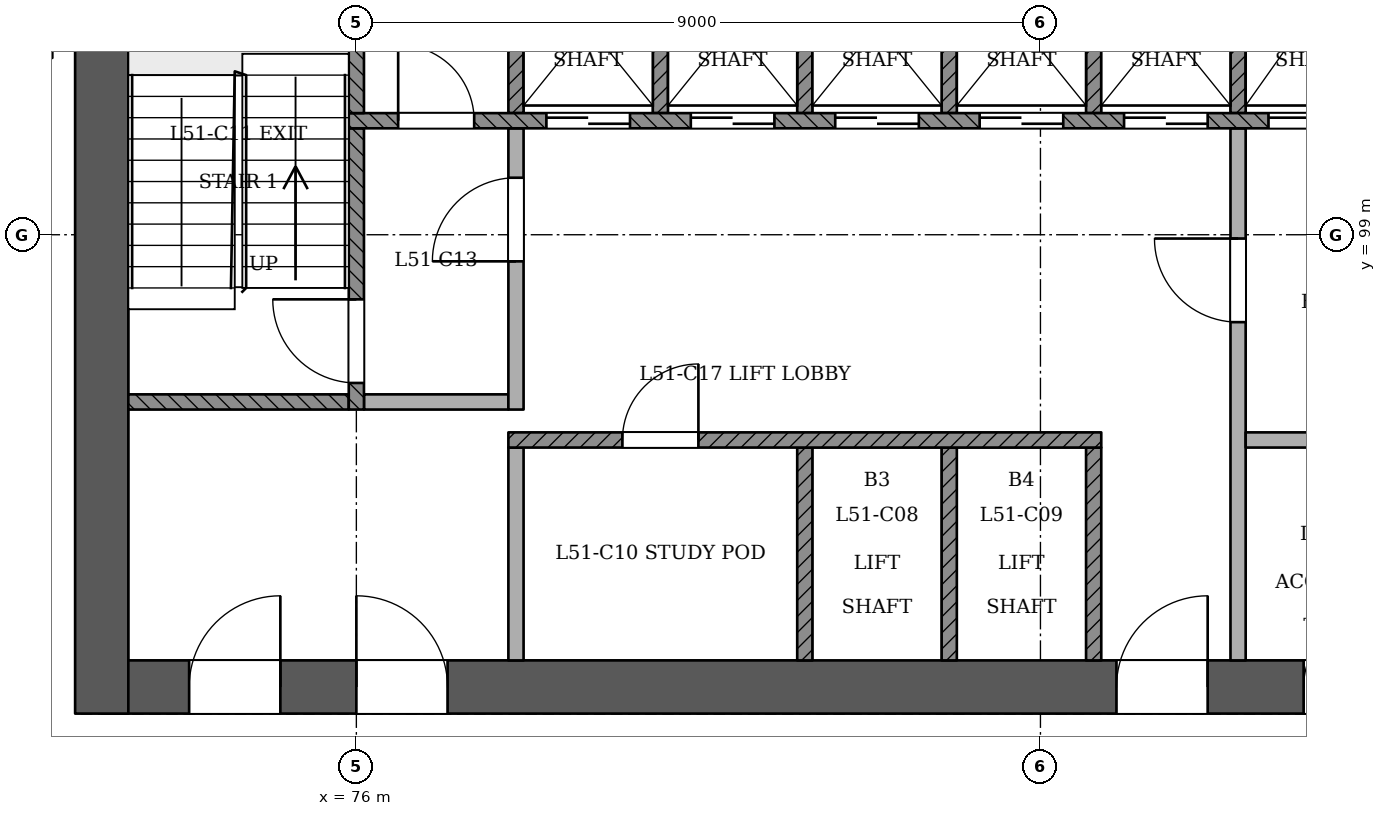
"""IFC4 building model, lengths in metres.
Left out: names, types, materials, properties, quantities, classifications, styles, units other than length and angle.
Written with IfcOpenShell. Run it as: python <this file> out.ifc"""

import sys

from ifc_helpers import new_model, si_unit, direction, frame, frame_2d, origin, place, context, subcontext, project, spatial, rectangle, extrude, element, fill, save


model = new_model("IFC4")
c1 = context("Model", 3, precision=1e-05, world=origin(), true_north=direction((0.0, 1.0)))
c2 = subcontext(c1, "Body", "Model", "MODEL_VIEW")
j1 = project(units=[si_unit("LENGTHUNIT", "METRE"), si_unit("PLANEANGLEUNIT", "RADIAN")], contexts=[c1])
p1 = place(None, origin())
s1 = spatial("IfcSite", under=j1, at=p1, CompositionType="ELEMENT")
p2 = place(p1, origin())
s2 = spatial("IfcBuilding", under=s1, at=p2, CompositionType="ELEMENT")
p3 = place(p2, frame((0.0, 0.0, 198.0)))
s3 = spatial("IfcBuildingStorey", under=s2, at=p3, CompositionType="ELEMENT", Elevation=198.0)
p4 = place(p3, frame((72.65, 93.05, 0.0), z_axis=(0.0, 0.0, 1.0), x_axis=(1.0, 0.0, 0.0)))
e1 = element("IfcWall", 1, at=p4, inside=s3, PredefinedType="SHEAR", context=c2, shape_type="SweptSolid", body=[
    extrude(rectangle(XDim=25.05, YDim=0.7, at=frame_2d((12.525, 0.0))), origin(), (0.0, 0.0, 1.0), 3.6),
])
p5 = place(p4, frame((1.15, 0.0, 0.0)))
e2 = element("IfcOpeningElement", 2, at=p5, cuts=e1, PredefinedType="OPENING", context=c2, shape_type="SweptSolid", body=[
    extrude(rectangle(XDim=1.2, YDim=2.1, at=frame_2d((0.6, 1.05))), frame((0.0, 0.36, 0.0), z_axis=(0.0, -1.0, 0.0), x_axis=(1.0, 0.0, 0.0)), (0.0, 0.0, 1.0), 0.721),
])
p6 = place(p4, frame((3.35, 0.0, 0.0)))
e3 = element("IfcOpeningElement", 3, at=p6, cuts=e1, PredefinedType="OPENING", context=c2, shape_type="SweptSolid", body=[
    extrude(rectangle(XDim=1.2, YDim=2.1, at=frame_2d((0.6, 1.05))), frame((0.0, 0.36, 0.0), z_axis=(0.0, -1.0, 0.0), x_axis=(1.0, 0.0, 0.0)), (0.0, 0.0, 1.0), 0.721),
])
p7 = place(p4, frame((13.35, 0.0, 0.0)))
e4 = element("IfcOpeningElement", 4, at=p7, cuts=e1, PredefinedType="OPENING", context=c2, shape_type="SweptSolid", body=[
    extrude(rectangle(XDim=1.2, YDim=2.1, at=frame_2d((0.6, 1.05))), frame((0.0, 0.36, 0.0), z_axis=(0.0, -1.0, 0.0), x_axis=(1.0, 0.0, 0.0)), (0.0, 0.0, 1.0), 0.721),
])
p8 = place(p4, frame((15.812, 0.0, 0.0)))
e5 = element("IfcOpeningElement", 5, at=p8, cuts=e1, PredefinedType="OPENING", context=c2, shape_type="SweptSolid", body=[
    extrude(rectangle(XDim=1.0, YDim=2.1, at=frame_2d((0.5, 1.05))), frame((0.0, 0.36, 0.0), z_axis=(0.0, -1.0, 0.0), x_axis=(1.0, 0.0, 0.0)), (0.0, 0.0, 1.0), 0.721),
])
p9 = place(p4, frame((18.25, 0.0, 0.0)))
e6 = element("IfcOpeningElement", 6, at=p9, cuts=e1, PredefinedType="OPENING", context=c2, shape_type="SweptSolid", body=[
    extrude(rectangle(XDim=1.0, YDim=2.1, at=frame_2d((0.5, 1.05))), frame((0.0, 0.36, 0.0), z_axis=(0.0, -1.0, 0.0), x_axis=(1.0, 0.0, 0.0)), (0.0, 0.0, 1.0), 0.721),
])
p10 = place(p4, frame((20.6, 0.0, 0.0)))
e7 = element("IfcOpeningElement", 7, at=p10, cuts=e1, PredefinedType="OPENING", context=c2, shape_type="SweptSolid", body=[
    extrude(rectangle(XDim=1.0, YDim=2.1, at=frame_2d((0.5, 1.05))), frame((0.0, 0.36, 0.0), z_axis=(0.0, -1.0, 0.0), x_axis=(1.0, 0.0, 0.0)), (0.0, 0.0, 1.0), 0.721),
])
p11 = place(p4, frame((22.887, 0.0, 0.0)))
e8 = element("IfcOpeningElement", 8, at=p11, cuts=e1, PredefinedType="OPENING", context=c2, shape_type="SweptSolid", body=[
    extrude(rectangle(XDim=1.0, YDim=2.1, at=frame_2d((0.5, 1.05))), frame((0.0, 0.36, 0.0), z_axis=(0.0, -1.0, 0.0), x_axis=(1.0, 0.0, 0.0)), (0.0, 0.0, 1.0), 0.721),
])
p12 = place(p3, frame((72.65, 103.75, 0.0), z_axis=(0.0, 0.0, 1.0), x_axis=(0.0, -1.0, 0.0)))
e9 = element("IfcWall", 9, at=p12, inside=s3, PredefinedType="SHEAR", context=c2, shape_type="SweptSolid", body=[
    extrude(rectangle(XDim=11.05, YDim=0.7, at=frame_2d((5.525, 0.0))), origin(), (0.0, 0.0, 1.0), 3.6),
])
p13 = place(p3, frame((78.1, 93.4, 0.0), z_axis=(0.0, 0.0, 1.0), x_axis=(0.0, 1.0, 0.0)))
e10 = element("IfcWall", 10, at=p13, inside=s3, PredefinedType="PARTITIONING", context=c2, shape_type="SweptSolid", body=[
    extrude(rectangle(XDim=2.8, YDim=0.2, at=frame_2d((1.4, 0.0))), origin(), (0.0, 0.0, 1.0), 3.15),
])
for number, where, z_axis, x_axis in (
    (11, (81.9, 93.4, 0.0), (0.0, 0.0, 1.0), (0.0, 1.0, 0.0)),
    (12, (83.8, 93.4, 0.0), (0.0, 0.0, 1.0), (0.0, 1.0, 0.0)),
    (13, (85.7, 93.4, 0.0), (0.0, 0.0, 1.0), (0.0, 1.0, 0.0)),
):
    element("IfcWall", number, at=place(p3, frame(where, z_axis=z_axis, x_axis=x_axis)), inside=s3, PredefinedType="SOLIDWALL", context=c2, shape_type="SweptSolid", body=[
        extrude(rectangle(XDim=2.8, YDim=0.2, at=frame_2d((1.4, 0.0))), origin(), (0.0, 0.0, 1.0), 3.15),
    ])
p14 = place(p3, frame((87.6, 93.4, 0.0), z_axis=(0.0, 0.0, 1.0), x_axis=(0.0, 1.0, 0.0)))
e14 = element("IfcWall", 14, at=p14, inside=s3, PredefinedType="PARTITIONING", context=c2, shape_type="SweptSolid", body=[
    extrude(rectangle(XDim=7.0, YDim=0.2, at=frame_2d((3.5, 0.0))), origin(), (0.0, 0.0, 1.0), 3.15),
])
p15 = place(p14, frame((4.45, 0.0, 0.0)))
e15 = element("IfcOpeningElement", 15, at=p15, cuts=e14, PredefinedType="OPENING", context=c2, shape_type="SweptSolid", body=[
    extrude(rectangle(XDim=1.1, YDim=2.1, at=frame_2d((0.55, 1.05))), frame((0.0, 0.11, 0.0), z_axis=(0.0, -1.0, 0.0), x_axis=(1.0, 0.0, 0.0)), (0.0, 0.0, 1.0), 0.221),
])
p16 = place(p3, frame((78.0, 96.3, 0.0), z_axis=(0.0, 0.0, 1.0), x_axis=(1.0, 0.0, 0.0)))
e16 = element("IfcWall", 16, at=p16, inside=s3, PredefinedType="SOLIDWALL", context=c2, shape_type="SweptSolid", body=[
    extrude(rectangle(XDim=7.8, YDim=0.2, at=frame_2d((3.9, 0.0))), origin(), (0.0, 0.0, 1.0), 3.15),
])
p17 = place(p16, frame((1.5, 0.0, 0.0)))
e17 = element("IfcOpeningElement", 17, at=p17, cuts=e16, PredefinedType="OPENING", context=c2, shape_type="SweptSolid", body=[
    extrude(rectangle(XDim=1.0, YDim=2.1, at=frame_2d((0.5, 1.05))), frame((0.0, 0.11, 0.0), z_axis=(0.0, -1.0, 0.0), x_axis=(1.0, 0.0, 0.0)), (0.0, 0.0, 1.0), 0.221),
])
p18 = place(p3, frame((87.7, 96.3, 0.0), z_axis=(0.0, 0.0, 1.0), x_axis=(1.0, 0.0, 0.0)))
e18 = element("IfcWall", 18, at=p18, inside=s3, PredefinedType="PARTITIONING", context=c2, shape_type="SweptSolid", body=[
    extrude(rectangle(XDim=3.6, YDim=0.2, at=frame_2d((1.8, 0.0))), origin(), (0.0, 0.0, 1.0), 3.15),
])
p19 = place(p3, frame((73.0, 96.8, 0.0), z_axis=(0.0, 0.0, 1.0), x_axis=(1.0, 0.0, 0.0)))
e19 = element("IfcWall", 19, at=p19, inside=s3, PredefinedType="SOLIDWALL", context=c2, shape_type="SweptSolid", body=[
    extrude(rectangle(XDim=2.9, YDim=0.2, at=frame_2d((1.45, 0.0))), origin(), (0.0, 0.0, 1.0), 3.15),
])
p20 = place(p3, frame((76.0, 96.7, 0.0), z_axis=(0.0, 0.0, 1.0), x_axis=(0.0, 1.0, 0.0)))
e20 = element("IfcWall", 20, at=p20, inside=s3, PredefinedType="SOLIDWALL", context=c2, shape_type="SweptSolid", body=[
    extrude(rectangle(XDim=3.7, YDim=0.2, at=frame_2d((1.85, 0.0))), origin(), (0.0, 0.0, 1.0), 3.15),
])
p21 = place(p20, frame((0.35, 0.0, 0.0)))
e21 = element("IfcOpeningElement", 21, at=p21, cuts=e20, PredefinedType="OPENING", context=c2, shape_type="SweptSolid", body=[
    extrude(rectangle(XDim=1.1, YDim=2.1, at=frame_2d((0.55, 1.05))), frame((0.0, 0.11, 0.0), z_axis=(0.0, -1.0, 0.0), x_axis=(1.0, 0.0, 0.0)), (0.0, 0.0, 1.0), 0.221),
])
p22 = place(p3, frame((76.1, 96.8, 0.0), z_axis=(0.0, 0.0, 1.0), x_axis=(1.0, 0.0, 0.0)))
e22 = element("IfcWall", 22, at=p22, inside=s3, PredefinedType="PARTITIONING", context=c2, shape_type="SweptSolid", body=[
    extrude(rectangle(XDim=1.9, YDim=0.2, at=frame_2d((0.95, 0.0))), origin(), (0.0, 0.0, 1.0), 3.15),
])
p23 = place(p3, frame((78.1, 96.7, 0.0), z_axis=(0.0, 0.0, 1.0), x_axis=(0.0, 1.0, 0.0)))
e23 = element("IfcWall", 23, at=p23, inside=s3, PredefinedType="PARTITIONING", context=c2, shape_type="SweptSolid", body=[
    extrude(rectangle(XDim=3.7, YDim=0.2, at=frame_2d((1.85, 0.0))), origin(), (0.0, 0.0, 1.0), 3.15),
])
p24 = place(p23, frame((1.95, 0.0, 0.0)))
e24 = element("IfcOpeningElement", 24, at=p24, cuts=e23, PredefinedType="OPENING", context=c2, shape_type="SweptSolid", body=[
    extrude(rectangle(XDim=1.1, YDim=2.1, at=frame_2d((0.55, 1.05))), frame((0.0, 0.11, 0.0), z_axis=(0.0, -1.0, 0.0), x_axis=(1.0, 0.0, 0.0)), (0.0, 0.0, 1.0), 0.221),
])
p25 = place(p3, frame((75.9, 100.5, 0.0), z_axis=(0.0, 0.0, 1.0), x_axis=(1.0, 0.0, 0.0)))
e25 = element("IfcWall", 25, at=p25, inside=s3, PredefinedType="SOLIDWALL", context=c2, shape_type="SweptSolid", body=[
    extrude(rectangle(XDim=18.2, YDim=0.2, at=frame_2d((9.1, 0.0))), origin(), (0.0, 0.0, 1.0), 3.15),
])
p26 = place(p25, frame((2.6, 0.0, 0.0)))
e26 = element("IfcOpeningElement", 26, at=p26, cuts=e25, PredefinedType="OPENING", context=c2, shape_type="SweptSolid", body=[
    extrude(rectangle(XDim=1.1, YDim=2.1, at=frame_2d((0.55, 1.05))), frame((0.0, 0.11, 0.0), z_axis=(0.0, -1.0, 0.0), x_axis=(1.0, 0.0, 0.0)), (0.0, 0.0, 1.0), 0.221),
])
p27 = place(p25, frame((4.5, 0.0, 0.0)))
e27 = element("IfcOpeningElement", 27, at=p27, cuts=e25, PredefinedType="OPENING", context=c2, shape_type="SweptSolid", body=[
    extrude(rectangle(XDim=1.1, YDim=2.1, at=frame_2d((0.55, 1.05))), frame((0.0, 0.11, 0.0), z_axis=(0.0, -1.0, 0.0), x_axis=(1.0, 0.0, 0.0)), (0.0, 0.0, 1.0), 0.221),
])
p28 = place(p25, frame((6.4, 0.0, 0.0)))
e28 = element("IfcOpeningElement", 28, at=p28, cuts=e25, PredefinedType="OPENING", context=c2, shape_type="SweptSolid", body=[
    extrude(rectangle(XDim=1.1, YDim=2.1, at=frame_2d((0.55, 1.05))), frame((0.0, 0.11, 0.0), z_axis=(0.0, -1.0, 0.0), x_axis=(1.0, 0.0, 0.0)), (0.0, 0.0, 1.0), 0.221),
])
p29 = place(p25, frame((8.3, 0.0, 0.0)))
e29 = element("IfcOpeningElement", 29, at=p29, cuts=e25, PredefinedType="OPENING", context=c2, shape_type="SweptSolid", body=[
    extrude(rectangle(XDim=1.1, YDim=2.1, at=frame_2d((0.55, 1.05))), frame((0.0, 0.11, 0.0), z_axis=(0.0, -1.0, 0.0), x_axis=(1.0, 0.0, 0.0)), (0.0, 0.0, 1.0), 0.221),
])
p30 = place(p25, frame((10.2, 0.0, 0.0)))
e30 = element("IfcOpeningElement", 30, at=p30, cuts=e25, PredefinedType="OPENING", context=c2, shape_type="SweptSolid", body=[
    extrude(rectangle(XDim=1.1, YDim=2.1, at=frame_2d((0.55, 1.05))), frame((0.0, 0.11, 0.0), z_axis=(0.0, -1.0, 0.0), x_axis=(1.0, 0.0, 0.0)), (0.0, 0.0, 1.0), 0.221),
])
p31 = place(p25, frame((12.1, 0.0, 0.0)))
e31 = element("IfcOpeningElement", 31, at=p31, cuts=e25, PredefinedType="OPENING", context=c2, shape_type="SweptSolid", body=[
    extrude(rectangle(XDim=1.1, YDim=2.1, at=frame_2d((0.55, 1.05))), frame((0.0, 0.11, 0.0), z_axis=(0.0, -1.0, 0.0), x_axis=(1.0, 0.0, 0.0)), (0.0, 0.0, 1.0), 0.221),
])
p32 = place(p25, frame((14.0, 0.0, 0.0)))
e32 = element("IfcOpeningElement", 32, at=p32, cuts=e25, PredefinedType="OPENING", context=c2, shape_type="SweptSolid", body=[
    extrude(rectangle(XDim=1.1, YDim=2.1, at=frame_2d((0.55, 1.05))), frame((0.0, 0.11, 0.0), z_axis=(0.0, -1.0, 0.0), x_axis=(1.0, 0.0, 0.0)), (0.0, 0.0, 1.0), 0.221),
])
p33 = place(p25, frame((0.65, 0.0, 0.0)))
e33 = element("IfcOpeningElement", 33, at=p33, cuts=e25, PredefinedType="OPENING", context=c2, shape_type="SweptSolid", body=[
    extrude(rectangle(XDim=1.0, YDim=2.1, at=frame_2d((0.5, 1.05))), frame((0.0, 0.11, 0.0), z_axis=(0.0, -1.0, 0.0), x_axis=(1.0, 0.0, 0.0)), (0.0, 0.0, 1.0), 0.221),
])
p34 = place(p25, frame((16.3, 0.0, 0.0)))
e34 = element("IfcOpeningElement", 34, at=p34, cuts=e25, PredefinedType="OPENING", context=c2, shape_type="SweptSolid", body=[
    extrude(rectangle(XDim=1.0, YDim=2.1, at=frame_2d((0.5, 1.05))), frame((0.0, 0.11, 0.0), z_axis=(0.0, -1.0, 0.0), x_axis=(1.0, 0.0, 0.0)), (0.0, 0.0, 1.0), 0.221),
])
for number, where, z_axis, x_axis in (
    (35, (76.0, 100.6, 0.0), (0.0, 0.0, 1.0), (0.0, 1.0, 0.0)),
    (36, (78.1, 100.6, 0.0), (0.0, 0.0, 1.0), (0.0, 1.0, 0.0)),
    (37, (80.0, 100.6, 0.0), (0.0, 0.0, 1.0), (0.0, 1.0, 0.0)),
    (38, (81.9, 100.6, 0.0), (0.0, 0.0, 1.0), (0.0, 1.0, 0.0)),
    (39, (83.8, 100.6, 0.0), (0.0, 0.0, 1.0), (0.0, 1.0, 0.0)),
    (40, (85.7, 100.6, 0.0), (0.0, 0.0, 1.0), (0.0, 1.0, 0.0)),
    (41, (87.6, 100.6, 0.0), (0.0, 0.0, 1.0), (0.0, 1.0, 0.0)),
):
    element("IfcWall", number, at=place(p3, frame(where, z_axis=z_axis, x_axis=x_axis)), inside=s3, PredefinedType="SOLIDWALL", context=c2, shape_type="SweptSolid", body=[
        extrude(rectangle(XDim=2.8, YDim=0.2, at=frame_2d((1.4, 0.0))), origin(), (0.0, 0.0, 1.0), 3.15),
    ])
p35 = place(p26, origin())
e42 = element("IfcDoor", 42, at=p35, inside=s3, OperationType="SLIDING_TO_RIGHT", PredefinedType="NOTDEFINED", context=c2, shape_type="SweptSolid", body=[
    extrude(rectangle(XDim=1.1, YDim=2.1, at=frame_2d((0.55, 1.05))), frame((0.0, 0.025, 0.0), z_axis=(0.0, -1.0, 0.0), x_axis=(1.0, 0.0, 0.0)), (0.0, 0.0, 1.0), 0.05),
])
fill(e26, e42)
p36 = place(p27, origin())
e43 = element("IfcDoor", 43, at=p36, inside=s3, OperationType="SLIDING_TO_LEFT", PredefinedType="NOTDEFINED", context=c2, shape_type="SweptSolid", body=[
    extrude(rectangle(XDim=1.1, YDim=2.1, at=frame_2d((0.55, 1.05))), frame((0.0, 0.025, 0.0), z_axis=(0.0, -1.0, 0.0), x_axis=(1.0, 0.0, 0.0)), (0.0, 0.0, 1.0), 0.05),
])
fill(e27, e43)
p37 = place(p28, origin())
e44 = element("IfcDoor", 44, at=p37, inside=s3, OperationType="SLIDING_TO_RIGHT", PredefinedType="NOTDEFINED", context=c2, shape_type="SweptSolid", body=[
    extrude(rectangle(XDim=1.1, YDim=2.1, at=frame_2d((0.55, 1.05))), frame((0.0, 0.025, 0.0), z_axis=(0.0, -1.0, 0.0), x_axis=(1.0, 0.0, 0.0)), (0.0, 0.0, 1.0), 0.05),
])
fill(e28, e44)
p38 = place(p29, origin())
e45 = element("IfcDoor", 45, at=p38, inside=s3, OperationType="SLIDING_TO_LEFT", PredefinedType="NOTDEFINED", context=c2, shape_type="SweptSolid", body=[
    extrude(rectangle(XDim=1.1, YDim=2.1, at=frame_2d((0.55, 1.05))), frame((0.0, 0.025, 0.0), z_axis=(0.0, -1.0, 0.0), x_axis=(1.0, 0.0, 0.0)), (0.0, 0.0, 1.0), 0.05),
])
fill(e29, e45)
p39 = place(p30, origin())
e46 = element("IfcDoor", 46, at=p39, inside=s3, OperationType="SLIDING_TO_RIGHT", PredefinedType="NOTDEFINED", context=c2, shape_type="SweptSolid", body=[
    extrude(rectangle(XDim=1.1, YDim=2.1, at=frame_2d((0.55, 1.05))), frame((0.0, 0.025, 0.0), z_axis=(0.0, -1.0, 0.0), x_axis=(1.0, 0.0, 0.0)), (0.0, 0.0, 1.0), 0.05),
])
fill(e30, e46)
p40 = place(p31, origin())
e47 = element("IfcDoor", 47, at=p40, inside=s3, OperationType="SLIDING_TO_RIGHT", PredefinedType="NOTDEFINED", context=c2, shape_type="SweptSolid", body=[
    extrude(rectangle(XDim=1.1, YDim=2.1, at=frame_2d((0.55, 1.05))), frame((0.0, 0.025, 0.0), z_axis=(0.0, -1.0, 0.0), x_axis=(1.0, 0.0, 0.0)), (0.0, 0.0, 1.0), 0.05),
])
fill(e31, e47)
p41 = place(p21, origin())
e48 = element("IfcDoor", 48, at=p41, inside=s3, OperationType="SINGLE_SWING_RIGHT", PredefinedType="NOTDEFINED", context=c2, shape_type="SweptSolid", body=[
    extrude(rectangle(XDim=1.1, YDim=2.1, at=frame_2d((0.55, 1.05))), frame((0.0, 0.025, 0.0), z_axis=(0.0, -1.0, 0.0), x_axis=(1.0, 0.0, 0.0)), (0.0, 0.0, 1.0), 0.05),
])
fill(e21, e48)
p42 = place(p24, origin())
e49 = element("IfcDoor", 49, at=p42, inside=s3, OperationType="SINGLE_SWING_LEFT", PredefinedType="NOTDEFINED", context=c2, shape_type="SweptSolid", body=[
    extrude(rectangle(XDim=1.1, YDim=2.1, at=frame_2d((0.55, 1.05))), frame((0.0, 0.025, 0.0), z_axis=(0.0, -1.0, 0.0), x_axis=(1.0, 0.0, 0.0)), (0.0, 0.0, 1.0), 0.05),
])
fill(e24, e49)
p43 = place(p15, origin())
e50 = element("IfcDoor", 50, at=p43, inside=s3, OperationType="SINGLE_SWING_RIGHT", PredefinedType="NOTDEFINED", context=c2, shape_type="SweptSolid", body=[
    extrude(rectangle(XDim=1.1, YDim=2.1, at=frame_2d((0.55, 1.05))), frame((0.0, 0.025, 0.0), z_axis=(0.0, -1.0, 0.0), x_axis=(1.0, 0.0, 0.0)), (0.0, 0.0, 1.0), 0.05),
])
fill(e15, e50)
p44 = place(p5, origin())
e51 = element("IfcDoor", 51, at=p44, inside=s3, OperationType="SINGLE_SWING_RIGHT", PredefinedType="NOTDEFINED", context=c2, shape_type="SweptSolid", body=[
    extrude(rectangle(XDim=1.2, YDim=2.1, at=frame_2d((0.6, 1.05))), frame((0.0, 0.025, 0.0), z_axis=(0.0, -1.0, 0.0), x_axis=(1.0, 0.0, 0.0)), (0.0, 0.0, 1.0), 0.05),
])
fill(e2, e51)
p45 = place(p6, origin())
e52 = element("IfcDoor", 52, at=p45, inside=s3, OperationType="SINGLE_SWING_LEFT", PredefinedType="NOTDEFINED", context=c2, shape_type="SweptSolid", body=[
    extrude(rectangle(XDim=1.2, YDim=2.1, at=frame_2d((0.6, 1.05))), frame((0.0, 0.025, 0.0), z_axis=(0.0, -1.0, 0.0), x_axis=(1.0, 0.0, 0.0)), (0.0, 0.0, 1.0), 0.05),
])
fill(e3, e52)
p46 = place(p7, origin())
e53 = element("IfcDoor", 53, at=p46, inside=s3, OperationType="SINGLE_SWING_RIGHT", PredefinedType="NOTDEFINED", context=c2, shape_type="SweptSolid", body=[
    extrude(rectangle(XDim=1.2, YDim=2.1, at=frame_2d((0.6, 1.05))), frame((0.0, 0.025, 0.0), z_axis=(0.0, -1.0, 0.0), x_axis=(1.0, 0.0, 0.0)), (0.0, 0.0, 1.0), 0.05),
])
fill(e4, e53)
p47 = place(p33, origin())
e54 = element("IfcDoor", 54, at=p47, inside=s3, OperationType="SINGLE_SWING_LEFT", PredefinedType="NOTDEFINED", context=c2, shape_type="SweptSolid", body=[
    extrude(rectangle(XDim=1.0, YDim=2.1, at=frame_2d((0.5, 1.05))), frame((0.0, 0.025, 0.0), z_axis=(0.0, -1.0, 0.0), x_axis=(1.0, 0.0, 0.0)), (0.0, 0.0, 1.0), 0.05),
])
fill(e33, e54)
p48 = place(p8, origin())
e55 = element("IfcDoor", 55, at=p48, inside=s3, OperationType="SINGLE_SWING_RIGHT", PredefinedType="NOTDEFINED", context=c2, shape_type="SweptSolid", body=[
    extrude(rectangle(XDim=1.0, YDim=2.1, at=frame_2d((0.5, 1.05))), frame((0.0, 0.025, 0.0), z_axis=(0.0, -1.0, 0.0), x_axis=(1.0, 0.0, 0.0)), (0.0, 0.0, 1.0), 0.05),
])
fill(e5, e55)
p49 = place(p17, origin())
e56 = element("IfcDoor", 56, at=p49, inside=s3, OperationType="SINGLE_SWING_RIGHT", PredefinedType="NOTDEFINED", context=c2, shape_type="SweptSolid", body=[
    extrude(rectangle(XDim=1.0, YDim=2.1, at=frame_2d((0.5, 1.05))), frame((0.0, 0.025, 0.0), z_axis=(0.0, -1.0, 0.0), x_axis=(1.0, 0.0, 0.0)), (0.0, 0.0, 1.0), 0.05),
])
fill(e17, e56)
save(model, sys.argv[1])
